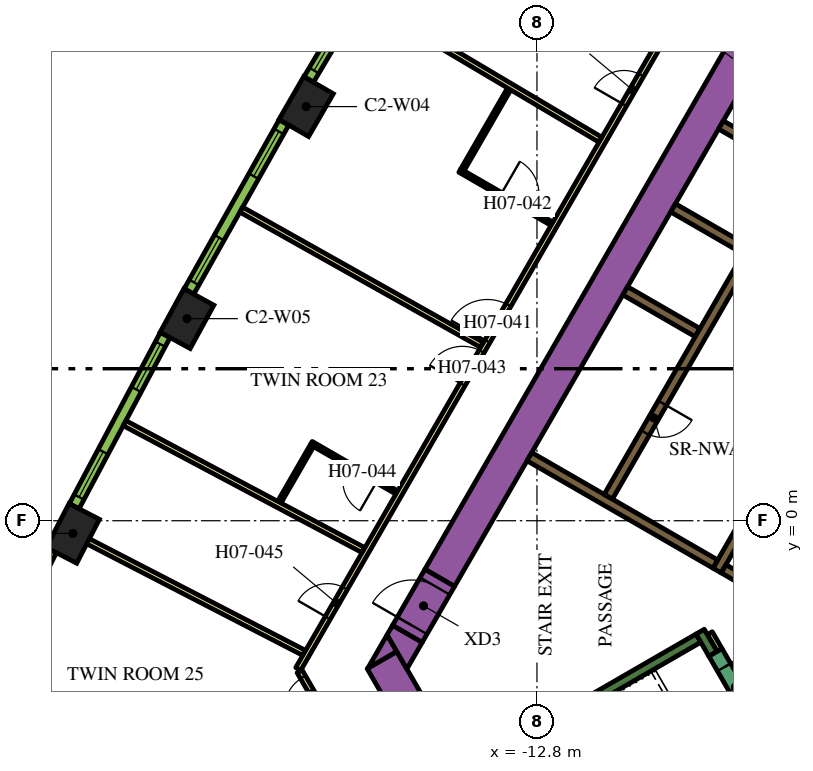
"""IFC4 building model, lengths in metres.
Left out: names, types, materials, properties, quantities, classifications, styles, units other than length and angle.
Written with IfcOpenShell. Run it as: python <this file> out.ifc"""

import sys

from ifc_helpers import new_model, si_unit, direction, frame, frame_2d, origin, origin_2d, place, context, subcontext, project, spatial, polyline, rectangle, outline, extrude, element, fill, save


model = new_model("IFC4")
c1 = context("Model", 3, precision=1e-05, world=origin(), true_north=direction((0.0, 1.0)))
c2 = subcontext(c1, "Body", "Model", "MODEL_VIEW")
j1 = project(units=[si_unit("LENGTHUNIT", "METRE"), si_unit("PLANEANGLEUNIT", "RADIAN")], contexts=[c1])
p1 = place(None, origin())
s1 = spatial("IfcSite", under=j1, at=p1, CompositionType="ELEMENT")
p2 = place(p1, origin())
s2 = spatial("IfcBuilding", under=s1, at=p2, CompositionType="ELEMENT")
p3 = place(p2, frame((0.0, 0.0, 99.3)))
s3 = spatial("IfcBuildingStorey", under=s2, at=p3, CompositionType="ELEMENT", Elevation=99.3)
for number, where, z_axis, x_axis in (
    (1, (-18.874, 10.897, 0.0), (0.0, 0.0, 1.0), (-0.5, -0.866, 0.0)),
    (2, (-22.009, 5.317, 0.0), (0.0, 0.0, 1.0), (-0.48, -0.877, 0.0)),
    (3, (-25.012, -0.334, 0.0), (0.0, 0.0, 1.0), (-0.459, -0.888, 0.0)),
):
    element("IfcColumn", number, at=place(p3, frame(where, z_axis=z_axis, x_axis=x_axis)), inside=s3, PredefinedType="COLUMN", context=c2, shape_type="SweptSolid", body=[
        extrude(rectangle(XDim=1.3, YDim=0.9, at=origin_2d()), origin(), (0.0, 0.0, 1.0), 3.9),
    ])
p4 = place(p3, frame((-15.36, -1.503, 0.0), z_axis=(0.0, 0.0, 1.0), x_axis=(0.50000389221, 0.866023156604, 0.0)))
e4 = element("IfcWall", 4, at=p4, inside=s3, PredefinedType="SOLIDWALL", context=c2, shape_type="SweptSolid", body=[
    extrude(rectangle(XDim=21.0, YDim=0.9, at=frame_2d((10.5, 0.0))), origin(), (0.0, 0.0, 1.0), 3.9),
])
p5 = place(p3, frame((-12.134, -11.883, 0.0), z_axis=(0.0, 0.0, 1.0), x_axis=(-0.500005339912, 0.866022320763, 0.0)))
e5 = element("IfcWall", 5, at=p5, inside=s3, PredefinedType="SOLIDWALL", context=c2, shape_type="SweptSolid", body=[
    extrude(rectangle(XDim=9.488, YDim=0.9, at=frame_2d((4.744, 0.0))), origin(), (0.0, 0.0, 1.0), 3.9),
])
p6 = place(p3, origin())
e6 = element("IfcWall", 6, at=p6, inside=s3, PredefinedType="SOLIDWALL", context=c2, shape_type="SweptSolid", body=[
    extrude(outline(polyline([(-16.489, -3.44), (-17.251, -3.88), (-16.743, -3.0), (-16.489, -3.44)])), origin(), (0.0, 0.0, 1.0), 3.9),
])
e7 = element("IfcWall", 7, at=p6, inside=s3, PredefinedType="SOLIDWALL", context=c2, shape_type="SweptSolid", body=[
    extrude(outline(polyline([(-15.82, -3.201), (-16.223, -3.9), (-16.743, -3.0), (-16.599, -2.751), (-15.82, -3.201)])), origin(), (0.0, 0.0, 1.0), 3.9),
])
p7 = place(p3, frame((-14.44, -6.49, 0.0), z_axis=(0.0, 0.0, 1.0), x_axis=(0.866022966069, 0.500004222222, 0.0)))
e8 = element("IfcWall", 8, at=p7, inside=s3, PredefinedType="SOLIDWALL", context=c2, shape_type="SweptSolid", body=[
    extrude(rectangle(XDim=6.8, YDim=0.25, at=frame_2d((3.4, 0.0))), origin(), (0.0, 0.0, 1.0), 3.9),
])
p8 = place(p3, frame((-8.168, -3.503, 0.0), z_axis=(0.0, 0.0, 1.0), x_axis=(-0.499952099219, 0.866053057547, 0.0)))
e9 = element("IfcWall", 9, at=p8, inside=s3, PredefinedType="SOLIDWALL", context=c2, shape_type="SweptSolid", body=[
    extrude(rectangle(XDim=0.675, YDim=0.25, at=frame_2d((0.337, 0.0))), origin(), (0.0, 0.0, 1.0), 3.9),
])
p9 = place(p3, frame((-8.06, -1.311, 0.0), z_axis=(0.0, 0.0, 1.0), x_axis=(0.50000273126, 0.866023826885, 0.0)))
e10 = element("IfcWall", 10, at=p9, inside=s3, PredefinedType="SOLIDWALL", context=c2, shape_type="SweptSolid", body=[
    extrude(rectangle(XDim=10.33, YDim=0.25, at=frame_2d((5.165, 0.0))), origin(), (0.0, 0.0, 1.0), 3.9),
])
e11 = element("IfcWall", 11, at=p6, inside=s3, PredefinedType="SOLIDWALL", context=c2, shape_type="SweptSolid", body=[
    extrude(outline(polyline([(-5.922, -2.257), (-5.922, -2.257), (-5.705, -2.382), (-5.83, -2.598), (-6.483, -2.221), (-6.591, -2.033), (-6.591, -2.033), (-6.7, -2.096), (-7.952, -1.373), (-7.827, -1.156), (-5.922, -2.257)])), origin(), (0.0, 0.0, 1.0), 3.9),
])
p10 = place(p3, frame((-8.106, -1.14, 0.0), z_axis=(0.0, 0.0, 1.0), x_axis=(-0.866000643155, 0.500042884217, 0.0)))
e12 = element("IfcWall", 12, at=p10, inside=s3, PredefinedType="SOLIDWALL", context=c2, shape_type="SweptSolid", body=[
    extrude(rectangle(XDim=5.65, YDim=0.25, at=frame_2d((2.825, 0.0))), origin(), (0.0, 0.0, 1.0), 3.9),
])
for number, where, z_axis, x_axis in (
    (13, (-8.574, 4.95, 0.0), (0.0, 0.0, 1.0), (-0.866, 0.5, 0.0)),
    (14, (-7.314, 7.132, 0.0), (0.0, 0.0, 1.0), (-0.866, 0.5, 0.0)),
):
    element("IfcWall", number, at=place(p3, frame(where, z_axis=z_axis, x_axis=x_axis)), inside=s3, PredefinedType="SOLIDWALL", context=c2, shape_type="SweptSolid", body=[
        extrude(rectangle(XDim=2.2, YDim=0.25, at=frame_2d((1.1, 0.0))), origin(), (0.0, 0.0, 1.0), 3.9),
    ])
p11 = place(p3, frame((-7.959, 10.415, 0.0), z_axis=(0.0, 0.0, 1.0), x_axis=(0.866020958405, -0.500007699544, 0.0)))
e15 = element("IfcWall", 15, at=p11, inside=s3, PredefinedType="SOLIDWALL", context=c2, shape_type="SweptSolid", body=[
    extrude(rectangle(XDim=4.1, YDim=0.25, at=frame_2d((2.05, 0.0))), origin(), (0.0, 0.0, 1.0), 3.9),
])
p12 = place(p3, frame((-8.252, -2.958, 0.0), z_axis=(0.0, 0.0, 1.0), x_axis=(0.500174715838, -0.865924508047, 0.0)))
e16 = element("IfcWall", 16, at=p12, inside=s3, PredefinedType="PARTITIONING", context=c2, shape_type="SweptSolid", body=[
    extrude(rectangle(XDim=0.514, YDim=0.15, at=frame_2d((0.257, 0.0))), origin(), (0.0, 0.0, 1.0), 2.75),
])
p13 = place(p3, frame((-6.008, 9.144, 0.0), z_axis=(0.0, 0.0, 1.0), x_axis=(-0.500006956611, -0.866021387346, 0.0)))
e17 = element("IfcWall", 17, at=p13, inside=s3, PredefinedType="SOLIDWALL", context=c2, shape_type="SweptSolid", body=[
    extrude(rectangle(XDim=9.83, YDim=0.25, at=frame_2d((4.915, 0.0))), origin(), (0.0, 0.0, 1.0), 3.9),
])
p14 = place(p13, frame((6.985, 0.0, 0.0)))
e18 = element("IfcOpeningElement", 18, at=p14, cuts=e17, PredefinedType="OPENING", context=c2, shape_type="SweptSolid", body=[
    extrude(rectangle(XDim=0.9, YDim=2.1, at=frame_2d((0.45, 1.05))), frame((0.0, 0.135, 0.0), z_axis=(0.0, -1.0, 0.0), x_axis=(1.0, 0.0, 0.0)), (0.0, 0.0, 1.0), 0.27),
])
p15 = place(p3, frame((-8.103, -3.466, 0.0), z_axis=(0.0, 0.0, 1.0), x_axis=(0.500078061341, -0.865980330357, 0.0)))
e19 = element("IfcWall", 19, at=p15, inside=s3, PredefinedType="SOLIDWALL", context=c2, shape_type="SweptSolid", body=[
    extrude(rectangle(XDim=2.1, YDim=0.4, at=frame_2d((1.05, 0.0))), origin(), (0.0, 0.0, 1.0), 3.9),
])
p16 = place(p15, frame((0.45, 0.0, 0.0)))
e20 = element("IfcOpeningElement", 20, at=p16, cuts=e19, PredefinedType="OPENING", context=c2, shape_type="SweptSolid", body=[
    extrude(rectangle(XDim=1.2, YDim=2.1, at=frame_2d((0.6, 1.05))), frame((0.0, 0.21, 0.0), z_axis=(0.0, -1.0, 0.0), x_axis=(1.0, 0.0, 0.0)), (0.0, 0.0, 1.0), 0.42),
])
p17 = place(p3, frame((-16.209, -2.976, 0.0), z_axis=(0.0, 0.0, 1.0), x_axis=(0.499954529098, 0.86605165483, 0.0)))
e21 = element("IfcWall", 21, at=p17, inside=s3, PredefinedType="SOLIDWALL", context=c2, shape_type="SweptSolid", body=[
    extrude(rectangle(XDim=1.7, YDim=0.9, at=frame_2d((0.85, 0.0))), origin(), (0.0, 0.0, 1.0), 3.9),
])
p18 = place(p17, frame((0.25, 0.0, 0.0)))
e22 = element("IfcOpeningElement", 22, at=p18, cuts=e21, PredefinedType="OPENING", context=c2, shape_type="SweptSolid", body=[
    extrude(rectangle(XDim=1.2, YDim=2.1, at=frame_2d((0.6, 1.05))), frame((0.0, 0.46, 0.0), z_axis=(0.0, -1.0, 0.0), x_axis=(1.0, 0.0, 0.0)), (0.0, 0.0, 1.0), 0.92),
])
p19 = place(p3, frame((-19.081, -3.9, 0.0), z_axis=(0.0, 0.0, 1.0), x_axis=(0.499998313975, 0.866026377209, 0.0)))
e23 = element("IfcWall", 23, at=p19, inside=s3, PredefinedType="PARTITIONING", context=c2, shape_type="SweptSolid", body=[
    extrude(rectangle(XDim=25.766, YDim=0.15, at=frame_2d((12.883, 0.0))), origin(), (0.0, 0.0, 1.0), 2.75),
])
p20 = place(p19, frame((19.306, 0.0, 0.0)))
e24 = element("IfcOpeningElement", 24, at=p20, cuts=e23, PredefinedType="OPENING", context=c2, shape_type="SweptSolid", body=[
    extrude(rectangle(XDim=1.0, YDim=2.1, at=frame_2d((0.5, 1.05))), frame((0.0, 0.085, 0.0), z_axis=(0.0, -1.0, 0.0), x_axis=(1.0, 0.0, 0.0)), (0.0, 0.0, 1.0), 0.17),
])
p21 = place(p19, frame((17.144, 0.0, 0.0)))
e25 = element("IfcOpeningElement", 25, at=p21, cuts=e23, PredefinedType="OPENING", context=c2, shape_type="SweptSolid", body=[
    extrude(rectangle(XDim=0.9, YDim=2.1, at=frame_2d((0.45, 1.05))), frame((0.0, 0.085, 0.0), z_axis=(0.0, -1.0, 0.0), x_axis=(1.0, 0.0, 0.0)), (0.0, 0.0, 1.0), 0.17),
])
p22 = place(p19, frame((9.955, 0.0, 0.0)))
e26 = element("IfcOpeningElement", 26, at=p22, cuts=e23, PredefinedType="OPENING", context=c2, shape_type="SweptSolid", body=[
    extrude(rectangle(XDim=1.1, YDim=2.1, at=frame_2d((0.55, 1.05))), frame((0.0, 0.085, 0.0), z_axis=(0.0, -1.0, 0.0), x_axis=(1.0, 0.0, 0.0)), (0.0, 0.0, 1.0), 0.17),
])
p23 = place(p19, frame((8.648, 0.0, 0.0)))
e27 = element("IfcOpeningElement", 27, at=p23, cuts=e23, PredefinedType="OPENING", context=c2, shape_type="SweptSolid", body=[
    extrude(rectangle(XDim=1.0, YDim=2.1, at=frame_2d((0.5, 1.05))), frame((0.0, 0.085, 0.0), z_axis=(0.0, -1.0, 0.0), x_axis=(1.0, 0.0, 0.0)), (0.0, 0.0, 1.0), 0.17),
])
p24 = place(p19, frame((1.553, 0.0, 0.0)))
e28 = element("IfcOpeningElement", 28, at=p24, cuts=e23, PredefinedType="OPENING", context=c2, shape_type="SweptSolid", body=[
    extrude(rectangle(XDim=0.9, YDim=2.1, at=frame_2d((0.45, 1.05))), frame((0.0, 0.085, 0.0), z_axis=(0.0, -1.0, 0.0), x_axis=(1.0, 0.0, 0.0)), (0.0, 0.0, 1.0), 0.17),
])
p25 = place(p3, frame((-16.412, -8.523, 0.0), z_axis=(0.0, 0.0, 1.0), x_axis=(-0.500001929737, 0.866024289647, 0.0)))
e29 = element("IfcWall", 29, at=p25, inside=s3, PredefinedType="PARTITIONING", context=c2, shape_type="SweptSolid", body=[
    extrude(rectangle(XDim=5.268, YDim=0.15, at=frame_2d((2.634, 0.0))), origin(), (0.0, 0.0, 1.0), 2.75),
])
p26 = place(p25, frame((4.088, 0.0, 0.0)))
e30 = element("IfcOpeningElement", 30, at=p26, cuts=e29, PredefinedType="OPENING", context=c2, shape_type="SweptSolid", body=[
    extrude(rectangle(XDim=1.0, YDim=2.1, at=frame_2d((0.5, 1.05))), frame((0.0, 0.085, 0.0), z_axis=(0.0, -1.0, 0.0), x_axis=(1.0, 0.0, 0.0)), (0.0, 0.0, 1.0), 0.17),
])
p27 = place(p3, frame((-24.613, -0.541, 0.0), z_axis=(0.0, 0.0, 1.0), x_axis=(0.888459912519, -0.458954228487, 0.0)))
e31 = element("IfcWall", 31, at=p27, inside=s3, PredefinedType="PARTITIONING", context=c2, shape_type="SweptSolid", body=[
    extrude(rectangle(XDim=6.392, YDim=0.15, at=frame_2d((3.196, 0.0))), origin(), (0.0, 0.0, 1.0), 2.75),
])
p28 = place(p3, frame((-23.652, 2.567, 0.0), z_axis=(0.0, 0.0, 1.0), x_axis=(0.883019237957, -0.469336793144, 0.0)))
e32 = element("IfcWall", 32, at=p28, inside=s3, PredefinedType="PARTITIONING", context=c2, shape_type="SweptSolid", body=[
    extrude(rectangle(XDim=7.111, YDim=0.15, at=frame_2d((3.555, 0.0))), origin(), (0.0, 0.0, 1.0), 2.75),
])
for number, where, z_axis, x_axis in (
    (33, (-20.581, 8.185, 0.0), (0.0, 0.0, 1.0), (0.872, -0.49, 0.0)),
    (34, (-17.379, 13.731, 0.0), (0.0, 0.0, 1.0), (0.86, -0.51, 0.0)),
):
    element("IfcWall", number, at=place(p3, frame(where, z_axis=z_axis, x_axis=x_axis)), inside=s3, PredefinedType="PARTITIONING", context=c2, shape_type="SweptSolid", body=[
        extrude(rectangle(XDim=7.257, YDim=0.15, at=frame_2d((3.628, 0.0))), origin(), (0.0, 0.0, 1.0), 2.75),
    ])
p29 = place(p3, frame((-14.83, 9.213, 0.0), z_axis=(0.0, 0.0, 1.0), x_axis=(0.866034573852, -0.49998411664, 0.0)))
e35 = element("IfcWall", 35, at=p29, inside=s3, PredefinedType="PARTITIONING", context=c2, shape_type="SweptSolid", body=[
    extrude(rectangle(XDim=2.8, YDim=0.1, at=frame_2d((1.4, 0.0))), origin(), (0.0, 0.0, 1.0), 2.75),
])
p30 = place(p29, frame((1.25, 0.0, 0.0)))
e36 = element("IfcOpeningElement", 36, at=p30, cuts=e35, PredefinedType="OPENING", context=c2, shape_type="SweptSolid", body=[
    extrude(rectangle(XDim=1.0, YDim=2.1, at=frame_2d((0.5, 1.05))), frame((0.0, 0.06, 0.0), z_axis=(0.0, -1.0, 0.0), x_axis=(1.0, 0.0, 0.0)), (0.0, 0.0, 1.0), 0.12),
])
p31 = place(p3, frame((-14.762, 9.231, 0.0), z_axis=(0.0, 0.0, 1.0), x_axis=(0.500003092839, 0.866023618125, 0.0)))
e37 = element("IfcWall", 37, at=p31, inside=s3, PredefinedType="PARTITIONING", context=c2, shape_type="SweptSolid", body=[
    extrude(rectangle(XDim=2.46, YDim=0.1, at=frame_2d((1.23, 0.0))), origin(), (0.0, 0.0, 1.0), 2.75),
])
p32 = place(p3, frame((-16.487, 0.743, 0.0), z_axis=(0.0, 0.0, 1.0), x_axis=(-0.866021400173, 0.500006934395, 0.0)))
e38 = element("IfcWall", 38, at=p32, inside=s3, PredefinedType="PARTITIONING", context=c2, shape_type="SweptSolid", body=[
    extrude(rectangle(XDim=2.6, YDim=0.1, at=frame_2d((1.3, 0.0))), origin(), (0.0, 0.0, 1.0), 2.75),
])
p33 = place(p32, frame((0.6, 0.0, 0.0)))
e39 = element("IfcOpeningElement", 39, at=p33, cuts=e38, PredefinedType="OPENING", context=c2, shape_type="SweptSolid", body=[
    extrude(rectangle(XDim=0.9, YDim=2.1, at=frame_2d((0.45, 1.05))), frame((0.0, 0.06, 0.0), z_axis=(0.0, -1.0, 0.0), x_axis=(1.0, 0.0, 0.0)), (0.0, 0.0, 1.0), 0.12),
])
p34 = place(p3, frame((-18.726, 1.966, 0.0), z_axis=(0.0, 0.0, 1.0), x_axis=(-0.499954529098, -0.86605165483, 0.0)))
e40 = element("IfcWall", 40, at=p34, inside=s3, PredefinedType="PARTITIONING", context=c2, shape_type="SweptSolid", body=[
    extrude(rectangle(XDim=1.7, YDim=0.1, at=frame_2d((0.85, 0.0))), origin(), (0.0, 0.0, 1.0), 2.75),
])
p35 = place(p3, frame((-16.203, 15.998, 0.0), z_axis=(0.0, 0.0, 1.0), x_axis=(-0.510054281659, -0.860142214847, 0.0)))
e41 = element("IfcWall", 41, at=p35, inside=s3, PredefinedType="SOLIDWALL", context=c2, shape_type="SweptSolid", body=[
    extrude(rectangle(XDim=5.101, YDim=0.29, at=frame_2d((2.55, 0.0))), origin(), (0.0, 0.0, 1.0), 3.65),
])
p36 = place(p35, frame((0.273, 0.0, 0.9)))
e42 = element("IfcOpeningElement", 42, at=p36, cuts=e41, PredefinedType="OPENING", context=c2, shape_type="SweptSolid", body=[
    extrude(rectangle(XDim=1.35, YDim=2.15, at=frame_2d((0.675, 1.075))), frame((0.0, 0.155, 0.0), z_axis=(0.0, -1.0, 0.0), x_axis=(1.0, 0.0, 0.0)), (0.0, 0.0, 1.0), 0.31),
])
p37 = place(p35, frame((3.478, 0.0, 0.9)))
e43 = element("IfcOpeningElement", 43, at=p37, cuts=e41, PredefinedType="OPENING", context=c2, shape_type="SweptSolid", body=[
    extrude(rectangle(XDim=1.35, YDim=2.15, at=frame_2d((0.675, 1.075))), frame((0.0, 0.155, 0.0), z_axis=(0.0, -1.0, 0.0), x_axis=(1.0, 0.0, 0.0)), (0.0, 0.0, 1.0), 0.31),
])
p38 = place(p3, frame((-19.458, 10.48, 0.0), z_axis=(0.0, 0.0, 1.0), x_axis=(-0.48983164787, -0.87181704316, 0.0)))
e44 = element("IfcWall", 44, at=p38, inside=s3, PredefinedType="SOLIDWALL", context=c2, shape_type="SweptSolid", body=[
    extrude(rectangle(XDim=5.1, YDim=0.29, at=frame_2d((2.55, 0.0))), origin(), (0.0, 0.0, 1.0), 3.65),
])
p39 = place(p38, frame((0.272, 0.0, 0.9)))
e45 = element("IfcOpeningElement", 45, at=p39, cuts=e44, PredefinedType="OPENING", context=c2, shape_type="SweptSolid", body=[
    extrude(rectangle(XDim=1.35, YDim=2.15, at=frame_2d((0.675, 1.075))), frame((0.0, 0.155, 0.0), z_axis=(0.0, -1.0, 0.0), x_axis=(1.0, 0.0, 0.0)), (0.0, 0.0, 1.0), 0.31),
])
p40 = place(p38, frame((3.478, 0.0, 0.9)))
e46 = element("IfcOpeningElement", 46, at=p40, cuts=e44, PredefinedType="OPENING", context=c2, shape_type="SweptSolid", body=[
    extrude(rectangle(XDim=1.35, YDim=2.15, at=frame_2d((0.675, 1.075))), frame((0.0, 0.155, 0.0), z_axis=(0.0, -1.0, 0.0), x_axis=(1.0, 0.0, 0.0)), (0.0, 0.0, 1.0), 0.31),
])
p41 = place(p3, frame((-22.583, 4.887, 0.0), z_axis=(0.0, 0.0, 1.0), x_axis=(-0.469323203119, -0.883026461106, 0.0)))
e47 = element("IfcWall", 47, at=p41, inside=s3, PredefinedType="SOLIDWALL", context=c2, shape_type="SweptSolid", body=[
    extrude(rectangle(XDim=5.101, YDim=0.29, at=frame_2d((2.55, 0.0))), origin(), (0.0, 0.0, 1.0), 3.65),
])
p42 = place(p41, frame((0.273, 0.0, 0.9)))
e48 = element("IfcOpeningElement", 48, at=p42, cuts=e47, PredefinedType="OPENING", context=c2, shape_type="SweptSolid", body=[
    extrude(rectangle(XDim=1.35, YDim=2.15, at=frame_2d((0.675, 1.075))), frame((0.0, 0.155, 0.0), z_axis=(0.0, -1.0, 0.0), x_axis=(1.0, 0.0, 0.0)), (0.0, 0.0, 1.0), 0.31),
])
p43 = place(p41, frame((3.478, 0.0, 0.9)))
e49 = element("IfcOpeningElement", 49, at=p43, cuts=e47, PredefinedType="OPENING", context=c2, shape_type="SweptSolid", body=[
    extrude(rectangle(XDim=1.35, YDim=2.15, at=frame_2d((0.675, 1.075))), frame((0.0, 0.155, 0.0), z_axis=(0.0, -1.0, 0.0), x_axis=(1.0, 0.0, 0.0)), (0.0, 0.0, 1.0), 0.31),
])
p44 = place(p3, frame((-25.576, -0.778, 0.0), z_axis=(0.0, 0.0, 1.0), x_axis=(-0.448534297211, -0.893765620409, 0.0)))
e50 = element("IfcWall", 50, at=p44, inside=s3, PredefinedType="SOLIDWALL", context=c2, shape_type="SweptSolid", body=[
    extrude(rectangle(XDim=5.1, YDim=0.29, at=frame_2d((2.55, 0.0))), origin(), (0.0, 0.0, 1.0), 3.65),
])
p45 = place(p44, frame((0.272, 0.0, 0.9)))
e51 = element("IfcOpeningElement", 51, at=p45, cuts=e50, PredefinedType="OPENING", context=c2, shape_type="SweptSolid", body=[
    extrude(rectangle(XDim=1.35, YDim=2.15, at=frame_2d((0.675, 1.075))), frame((0.0, 0.155, 0.0), z_axis=(0.0, -1.0, 0.0), x_axis=(1.0, 0.0, 0.0)), (0.0, 0.0, 1.0), 0.31),
])
p46 = place(p44, frame((3.478, 0.0, 0.9)))
e52 = element("IfcOpeningElement", 52, at=p46, cuts=e50, PredefinedType="OPENING", context=c2, shape_type="SweptSolid", body=[
    extrude(rectangle(XDim=1.35, YDim=2.15, at=frame_2d((0.675, 1.075))), frame((0.0, 0.155, 0.0), z_axis=(0.0, -1.0, 0.0), x_axis=(1.0, 0.0, 0.0)), (0.0, 0.0, 1.0), 0.31),
])
p47 = place(p14, origin())
e53 = element("IfcDoor", 53, at=p47, inside=s3, OperationType="SINGLE_SWING_LEFT", PredefinedType="DOOR", context=c2, shape_type="SweptSolid", body=[
    extrude(rectangle(XDim=0.9, YDim=2.1, at=frame_2d((0.45, 1.05))), frame((0.0, 0.025, 0.0), z_axis=(0.0, -1.0, 0.0), x_axis=(1.0, 0.0, 0.0)), (0.0, 0.0, 1.0), 0.05),
])
fill(e18, e53)
p48 = place(p16, origin())
e54 = element("IfcDoor", 54, at=p48, inside=s3, OperationType="SINGLE_SWING_LEFT", PredefinedType="DOOR", context=c2, shape_type="SweptSolid", body=[
    extrude(rectangle(XDim=1.2, YDim=2.1, at=frame_2d((0.6, 1.05))), frame((0.0, 0.025, 0.0), z_axis=(0.0, -1.0, 0.0), x_axis=(1.0, 0.0, 0.0)), (0.0, 0.0, 1.0), 0.05),
])
fill(e20, e54)
p49 = place(p18, origin())
e55 = element("IfcDoor", 55, at=p49, inside=s3, OperationType="SINGLE_SWING_LEFT", PredefinedType="DOOR", context=c2, shape_type="SweptSolid", body=[
    extrude(rectangle(XDim=1.2, YDim=2.1, at=frame_2d((0.6, 1.05))), frame((0.0, 0.025, 0.0), z_axis=(0.0, -1.0, 0.0), x_axis=(1.0, 0.0, 0.0)), (0.0, 0.0, 1.0), 0.05),
])
fill(e22, e55)
p50 = place(p21, origin())
e56 = element("IfcDoor", 56, at=p50, inside=s3, OperationType="SINGLE_SWING_LEFT", PredefinedType="DOOR", context=c2, shape_type="SweptSolid", body=[
    extrude(rectangle(XDim=0.9, YDim=2.1, at=frame_2d((0.45, 1.05))), frame((0.0, 0.025, 0.0), z_axis=(0.0, -1.0, 0.0), x_axis=(1.0, 0.0, 0.0)), (0.0, 0.0, 1.0), 0.05),
])
fill(e25, e56)
p51 = place(p22, origin())
e57 = element("IfcDoor", 57, at=p51, inside=s3, OperationType="SINGLE_SWING_LEFT", PredefinedType="DOOR", context=c2, shape_type="SweptSolid", body=[
    extrude(rectangle(XDim=1.1, YDim=2.1, at=frame_2d((0.55, 1.05))), frame((0.0, 0.025, 0.0), z_axis=(0.0, -1.0, 0.0), x_axis=(1.0, 0.0, 0.0)), (0.0, 0.0, 1.0), 0.05),
])
fill(e26, e57)
p52 = place(p30, origin())
e58 = element("IfcDoor", 58, at=p52, inside=s3, OperationType="SINGLE_SWING_LEFT", PredefinedType="DOOR", context=c2, shape_type="SweptSolid", body=[
    extrude(rectangle(XDim=1.0, YDim=2.1, at=frame_2d((0.5, 1.05))), frame((0.0, 0.025, 0.0), z_axis=(0.0, -1.0, 0.0), x_axis=(1.0, 0.0, 0.0)), (0.0, 0.0, 1.0), 0.05),
])
fill(e36, e58)
p53 = place(p23, origin())
e59 = element("IfcDoor", 59, at=p53, inside=s3, OperationType="SINGLE_SWING_RIGHT", PredefinedType="DOOR", context=c2, shape_type="SweptSolid", body=[
    extrude(rectangle(XDim=1.0, YDim=2.1, at=frame_2d((0.5, 1.05))), frame((0.0, 0.025, 0.0), z_axis=(0.0, -1.0, 0.0), x_axis=(1.0, 0.0, 0.0)), (0.0, 0.0, 1.0), 0.05),
])
fill(e27, e59)
p54 = place(p33, origin())
e60 = element("IfcDoor", 60, at=p54, inside=s3, OperationType="SINGLE_SWING_LEFT", PredefinedType="DOOR", context=c2, shape_type="SweptSolid", body=[
    extrude(rectangle(XDim=0.9, YDim=2.1, at=frame_2d((0.45, 1.05))), frame((0.0, 0.025, 0.0), z_axis=(0.0, -1.0, 0.0), x_axis=(1.0, 0.0, 0.0)), (0.0, 0.0, 1.0), 0.05),
])
fill(e39, e60)
p55 = place(p24, origin())
e61 = element("IfcDoor", 61, at=p55, inside=s3, OperationType="SINGLE_SWING_RIGHT", PredefinedType="DOOR", context=c2, shape_type="SweptSolid", body=[
    extrude(rectangle(XDim=0.9, YDim=2.1, at=frame_2d((0.45, 1.05))), frame((0.0, 0.025, 0.0), z_axis=(0.0, -1.0, 0.0), x_axis=(1.0, 0.0, 0.0)), (0.0, 0.0, 1.0), 0.05),
])
fill(e28, e61)
p56 = place(p26, origin())
e62 = element("IfcDoor", 62, at=p56, inside=s3, OperationType="SINGLE_SWING_RIGHT", PredefinedType="DOOR", context=c2, shape_type="SweptSolid", body=[
    extrude(rectangle(XDim=1.0, YDim=2.1, at=frame_2d((0.5, 1.05))), frame((0.0, 0.025, 0.0), z_axis=(0.0, -1.0, 0.0), x_axis=(1.0, 0.0, 0.0)), (0.0, 0.0, 1.0), 0.05),
])
fill(e30, e62)
p57 = place(p37, origin())
e63 = element("IfcWindow", 63, at=p57, inside=s3, PartitioningType="DOUBLE_PANEL_VERTICAL", PredefinedType="WINDOW", context=c2, shape_type="SweptSolid", body=[
    extrude(rectangle(XDim=1.35, YDim=2.15, at=frame_2d((0.675, 1.075))), frame((0.0, 0.015, 0.0), z_axis=(0.0, -1.0, 0.0), x_axis=(1.0, 0.0, 0.0)), (0.0, 0.0, 1.0), 0.06),
])
fill(e43, e63)
p58 = place(p39, origin())
e64 = element("IfcWindow", 64, at=p58, inside=s3, PartitioningType="DOUBLE_PANEL_VERTICAL", PredefinedType="WINDOW", context=c2, shape_type="SweptSolid", body=[
    extrude(rectangle(XDim=1.35, YDim=2.15, at=frame_2d((0.675, 1.075))), frame((0.0, 0.015, 0.0), z_axis=(0.0, -1.0, 0.0), x_axis=(1.0, 0.0, 0.0)), (0.0, 0.0, 1.0), 0.06),
])
fill(e45, e64)
p59 = place(p40, origin())
e65 = element("IfcWindow", 65, at=p59, inside=s3, PartitioningType="DOUBLE_PANEL_VERTICAL", PredefinedType="WINDOW", context=c2, shape_type="SweptSolid", body=[
    extrude(rectangle(XDim=1.35, YDim=2.15, at=frame_2d((0.675, 1.075))), frame((0.0, 0.015, 0.0), z_axis=(0.0, -1.0, 0.0), x_axis=(1.0, 0.0, 0.0)), (0.0, 0.0, 1.0), 0.06),
])
fill(e46, e65)
p60 = place(p42, origin())
e66 = element("IfcWindow", 66, at=p60, inside=s3, PartitioningType="DOUBLE_PANEL_VERTICAL", PredefinedType="WINDOW", context=c2, shape_type="SweptSolid", body=[
    extrude(rectangle(XDim=1.35, YDim=2.15, at=frame_2d((0.675, 1.075))), frame((0.0, 0.015, 0.0), z_axis=(0.0, -1.0, 0.0), x_axis=(1.0, 0.0, 0.0)), (0.0, 0.0, 1.0), 0.06),
])
fill(e48, e66)
p61 = place(p43, origin())
e67 = element("IfcWindow", 67, at=p61, inside=s3, PartitioningType="DOUBLE_PANEL_VERTICAL", PredefinedType="WINDOW", context=c2, shape_type="SweptSolid", body=[
    extrude(rectangle(XDim=1.35, YDim=2.15, at=frame_2d((0.675, 1.075))), frame((0.0, 0.015, 0.0), z_axis=(0.0, -1.0, 0.0), x_axis=(1.0, 0.0, 0.0)), (0.0, 0.0, 1.0), 0.06),
])
fill(e49, e67)
save(model, sys.argv[1])
